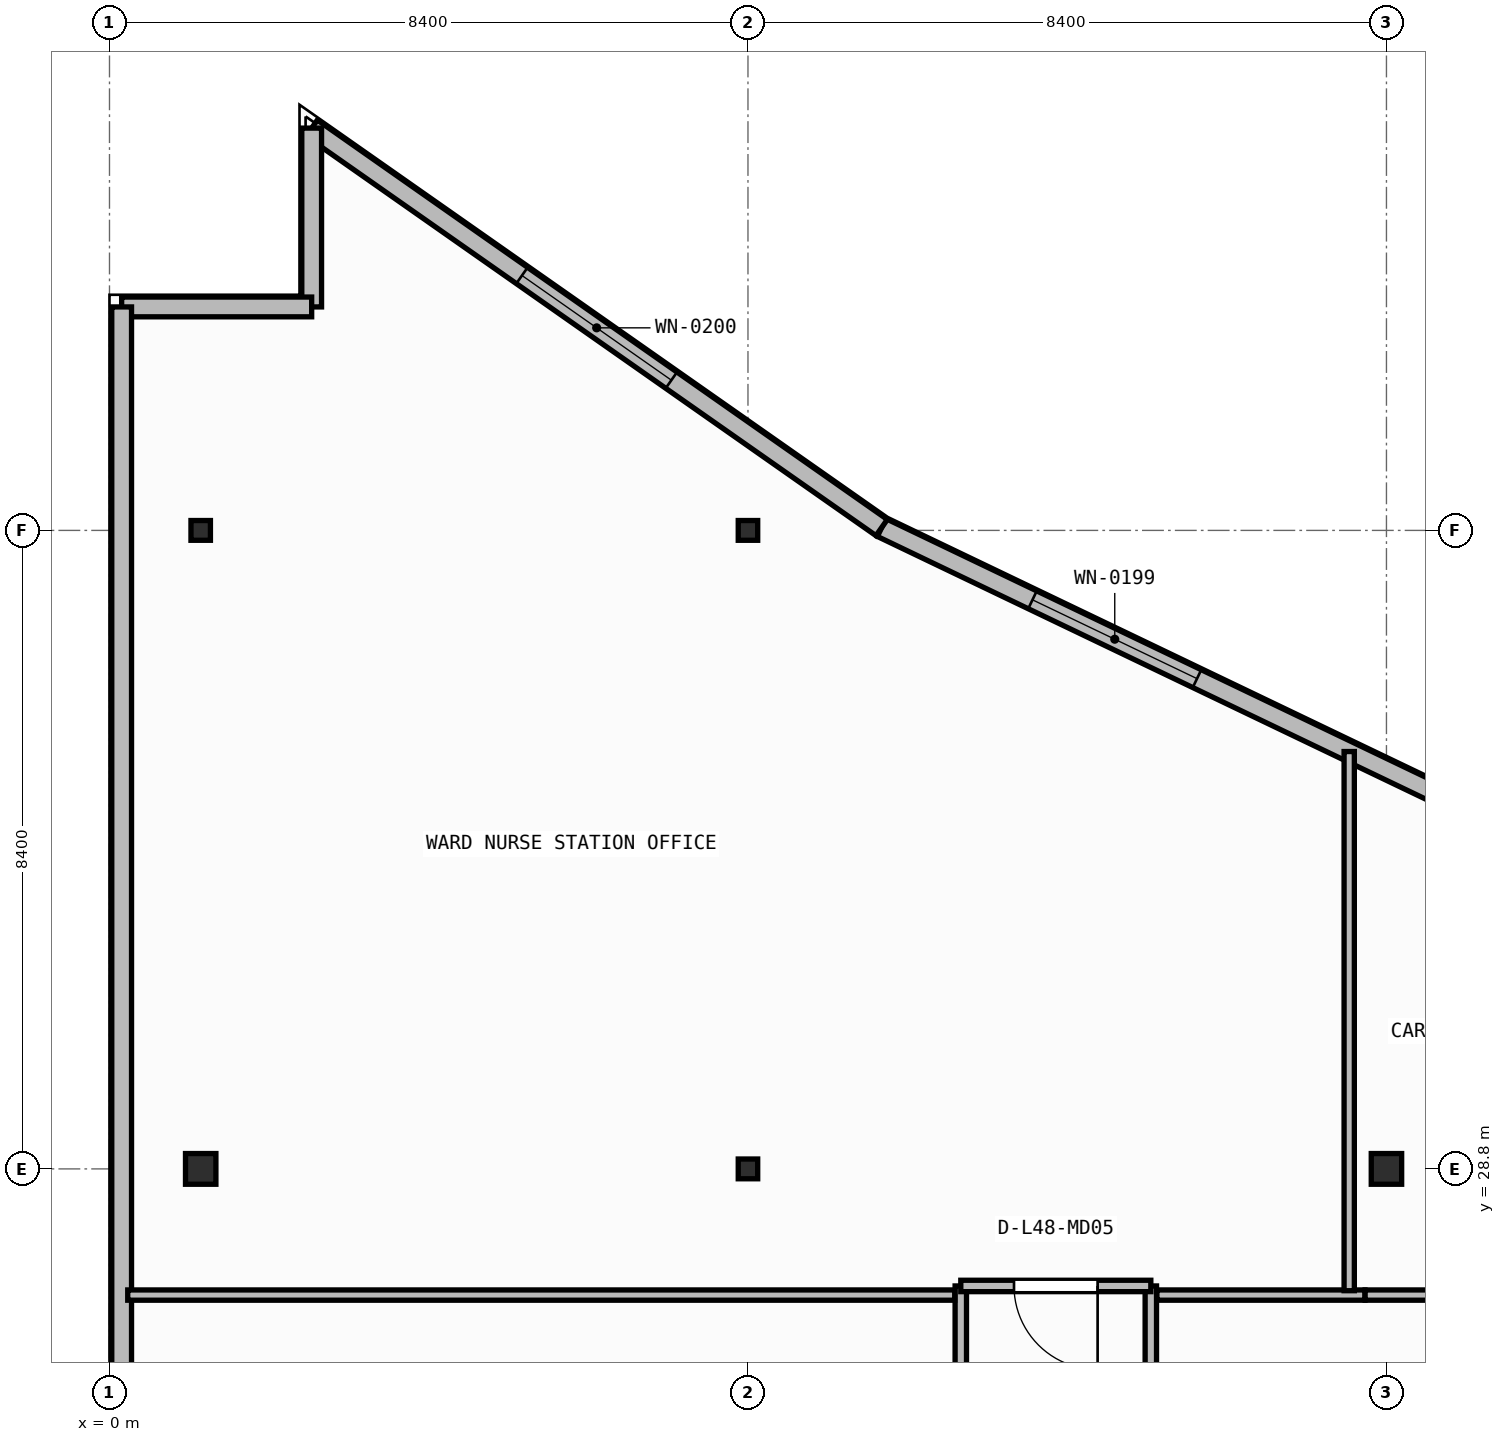
"""IFC4 building model, lengths in metres.
Left out: names, types, materials, properties, quantities, classifications, styles, units other than length and angle.
Written with IfcOpenShell. Run it as: python <this file> out.ifc"""

import sys

from ifc_helpers import new_model, si_unit, direction, frame, frame_2d, origin, origin_2d, place, context, subcontext, project, spatial, rectangle, i_section, extrude, element, fill, save


model = new_model("IFC4")
c1 = context("Model", 3, precision=1e-05, world=origin(), true_north=direction((0.0, 1.0)))
c2 = subcontext(c1, "Body", "Model", "MODEL_VIEW")
j1 = project(units=[si_unit("LENGTHUNIT", "METRE"), si_unit("PLANEANGLEUNIT", "RADIAN")], contexts=[c1])
p1 = place(None, origin())
s1 = spatial("IfcSite", under=j1, at=p1, CompositionType="ELEMENT")
p2 = place(p1, origin())
s2 = spatial("IfcBuilding", under=s1, at=p2, CompositionType="ELEMENT")
p3 = place(p2, frame((0.0, 0.0, 196.05)))
s3 = spatial("IfcBuildingStorey", under=s2, at=p3, CompositionType="ELEMENT", Elevation=196.05)
p4 = place(p3, frame((1.2, 28.8, 0.0), z_axis=(0.0, 0.0, 1.0), x_axis=(1.0, 0.0, 0.0)))
e1 = element("IfcColumn", 1, at=p4, inside=s3, PredefinedType="COLUMN", context=c2, shape_type="SweptSolid", body=[
    extrude(i_section(OverallWidth=0.4, OverallDepth=0.404, WebThickness=0.02, FlangeThickness=0.032, at=origin_2d()), origin(), (0.0, 0.0, 1.0), 3.95),
])
p5 = place(p3, frame((8.4, 28.8, 0.0), z_axis=(0.0, 0.0, 1.0), x_axis=(1.0, 0.0, 0.0)))
e2 = element("IfcColumn", 2, at=p5, inside=s3, PredefinedType="COLUMN", context=c2, shape_type="SweptSolid", body=[
    extrude(i_section(OverallWidth=0.256, OverallDepth=0.26, WebThickness=0.01, FlangeThickness=0.017, FilletRadius=0.013, at=origin_2d()), origin(), (0.0, 0.0, 1.0), 3.95),
])
p6 = place(p3, frame((16.8, 28.8, 0.0), z_axis=(0.0, 0.0, 1.0), x_axis=(1.0, 0.0, 0.0)))
e3 = element("IfcColumn", 3, at=p6, inside=s3, PredefinedType="COLUMN", context=c2, shape_type="SweptSolid", body=[
    extrude(i_section(OverallWidth=0.4, OverallDepth=0.404, WebThickness=0.02, FlangeThickness=0.032, at=origin_2d()), origin(), (0.0, 0.0, 1.0), 3.95),
])
for number, where, z_axis, x_axis in (
    (4, (1.2, 37.2, 0.0), (0.0, 0.0, 1.0), (1.0, 0.0, 0.0)),
    (5, (8.4, 37.2, 0.0), (0.0, 0.0, 1.0), (1.0, 0.0, 0.0)),
):
    element("IfcColumn", number, at=place(p3, frame(where, z_axis=z_axis, x_axis=x_axis)), inside=s3, PredefinedType="COLUMN", context=c2, shape_type="SweptSolid", body=[
        extrude(i_section(OverallWidth=0.256, OverallDepth=0.26, WebThickness=0.01, FlangeThickness=0.017, FilletRadius=0.013, at=origin_2d()), origin(), (0.0, 0.0, 1.0), 3.95),
    ])
p7 = place(p3, frame((21.461, 31.823, 0.0), z_axis=(0.0, 0.0, 1.0), x_axis=(-0.901858094827, 0.432032379336, 0.0)))
e6 = element("IfcWall", 6, at=p7, inside=s3, PredefinedType="STANDARD", context=c2, shape_type="SweptSolid", body=[
    extrude(rectangle(XDim=12.532, YDim=0.26, at=frame_2d((6.266, 0.0))), origin(), (0.0, 0.0, 1.0), 3.71),
])
p8 = place(p7, frame((7.932, 0.0, 0.9)))
e7 = element("IfcOpeningElement", 7, at=p8, cuts=e6, PredefinedType="OPENING", context=c2, shape_type="SweptSolid", body=[
    extrude(rectangle(XDim=2.4, YDim=1.65, at=frame_2d((1.2, 0.825))), frame((0.0, 0.14, 0.0), z_axis=(0.0, -1.0, 0.0), x_axis=(1.0, 0.0, 0.0)), (0.0, 0.0, 1.0), 0.28),
])
p9 = place(p3, frame((10.159, 37.237, 0.0), z_axis=(0.0, 0.0, 1.0), x_axis=(-0.818933702389, 0.57388813465, 0.0)))
e8 = element("IfcWall", 8, at=p9, inside=s3, PredefinedType="STANDARD", context=c2, shape_type="SweptSolid", body=[
    extrude(rectangle(XDim=9.157, YDim=0.26, at=frame_2d((4.579, 0.0))), origin(), (0.0, 0.0, 1.0), 3.71),
])
p10 = place(p9, frame((3.378, 0.0, 0.9)))
e9 = element("IfcOpeningElement", 9, at=p10, cuts=e8, PredefinedType="OPENING", context=c2, shape_type="SweptSolid", body=[
    extrude(rectangle(XDim=2.4, YDim=1.65, at=frame_2d((1.2, 0.825))), frame((0.0, 0.14, 0.0), z_axis=(0.0, -1.0, 0.0), x_axis=(1.0, 0.0, 0.0)), (0.0, 0.0, 1.0), 0.28),
])
p11 = place(p3, frame((2.66, 42.492, 0.0), z_axis=(0.0, 0.0, 1.0), x_axis=(0.0, -1.0, 0.0)))
e10 = element("IfcWall", 10, at=p11, inside=s3, PredefinedType="STANDARD", context=c2, shape_type="SweptSolid", body=[
    extrude(rectangle(XDim=2.353, YDim=0.26, at=frame_2d((1.176, 0.0))), origin(), (0.0, 0.0, 1.0), 3.71),
])
p12 = place(p3, frame((2.66, 40.14, 0.0), z_axis=(0.0, 0.0, 1.0), x_axis=(-1.0, 0.0, 0.0)))
e11 = element("IfcWall", 11, at=p12, inside=s3, PredefinedType="STANDARD", context=c2, shape_type="SweptSolid", body=[
    extrude(rectangle(XDim=2.5, YDim=0.26, at=frame_2d((1.25, 0.0))), origin(), (0.0, 0.0, 1.0), 3.71),
])
p13 = place(p3, frame((0.16, 40.14, 0.0), z_axis=(0.0, 0.0, 1.0), x_axis=(0.0, -1.0, 0.0)))
e12 = element("IfcWall", 12, at=p13, inside=s3, PredefinedType="STANDARD", context=c2, shape_type="SweptSolid", body=[
    extrude(rectangle(XDim=37.48, YDim=0.26, at=frame_2d((18.74, 0.0))), origin(), (0.0, 0.0, 1.0), 3.71),
])
p14 = place(p13, frame((27.4, 0.0, 0.9)))
e13 = element("IfcOpeningElement", 13, at=p14, cuts=e12, PredefinedType="OPENING", context=c2, shape_type="SweptSolid", body=[
    extrude(rectangle(XDim=2.4, YDim=1.65, at=frame_2d((1.2, 0.825))), frame((0.0, 0.14, 0.0), z_axis=(0.0, -1.0, 0.0), x_axis=(1.0, 0.0, 0.0)), (0.0, 0.0, 1.0), 0.28),
])
p15 = place(p3, frame((11.2, 27.26, 0.0), z_axis=(0.0, 0.0, 1.0), x_axis=(0.0, -1.0, 0.0)))
e14 = element("IfcWall", 14, at=p15, inside=s3, PredefinedType="PARTITIONING", context=c2, shape_type="SweptSolid", body=[
    extrude(rectangle(XDim=6.592, YDim=0.15, at=frame_2d((3.296, 0.0))), origin(), (0.0, 0.0, 1.0), 3.71),
])
p16 = place(p15, frame((2.746, 0.0, 0.0)))
e15 = element("IfcOpeningElement", 15, at=p16, cuts=e14, PredefinedType="OPENING", context=c2, shape_type="SweptSolid", body=[
    extrude(rectangle(XDim=1.1, YDim=2.1, at=frame_2d((0.55, 1.05))), frame((0.0, 0.085, 0.0), z_axis=(0.0, -1.0, 0.0), x_axis=(1.0, 0.0, 0.0)), (0.0, 0.0, 1.0), 0.17),
])
p17 = place(p3, frame((13.7, 20.668, 0.0), z_axis=(0.0, 0.0, 1.0), x_axis=(0.0, 1.0, 0.0)))
e16 = element("IfcWall", 16, at=p17, inside=s3, PredefinedType="PARTITIONING", context=c2, shape_type="SweptSolid", body=[
    extrude(rectangle(XDim=6.592, YDim=0.15, at=frame_2d((3.296, 0.0))), origin(), (0.0, 0.0, 1.0), 3.71),
])
p18 = place(p17, frame((2.746, 0.0, 0.0)))
e17 = element("IfcOpeningElement", 17, at=p18, cuts=e16, PredefinedType="OPENING", context=c2, shape_type="SweptSolid", body=[
    extrude(rectangle(XDim=1.1, YDim=2.1, at=frame_2d((0.55, 1.05))), frame((0.0, 0.085, 0.0), z_axis=(0.0, -1.0, 0.0), x_axis=(1.0, 0.0, 0.0)), (0.0, 0.0, 1.0), 0.17),
])
p19 = place(p3, frame((13.7, 27.26, 0.0), z_axis=(0.0, 0.0, 1.0), x_axis=(-1.0, 0.0, 0.0)))
e18 = element("IfcWall", 18, at=p19, inside=s3, PredefinedType="PARTITIONING", context=c2, shape_type="SweptSolid", body=[
    extrude(rectangle(XDim=2.5, YDim=0.15, at=frame_2d((1.25, 0.0))), origin(), (0.0, 0.0, 1.0), 3.71),
])
p20 = place(p19, frame((0.7, 0.0, 0.0)))
e19 = element("IfcOpeningElement", 19, at=p20, cuts=e18, PredefinedType="OPENING", context=c2, shape_type="SweptSolid", body=[
    extrude(rectangle(XDim=1.1, YDim=2.1, at=frame_2d((0.55, 1.05))), frame((0.0, 0.085, 0.0), z_axis=(0.0, -1.0, 0.0), x_axis=(1.0, 0.0, 0.0)), (0.0, 0.0, 1.0), 0.17),
])
p21 = place(p3, frame((11.12, 27.14, 0.0), z_axis=(0.0, 0.0, 1.0), x_axis=(-1.0, 0.0, 0.0)))
e20 = element("IfcWall", 20, at=p21, inside=s3, PredefinedType="PARTITIONING", context=c2, shape_type="SweptSolid", body=[
    extrude(rectangle(XDim=10.88, YDim=0.135, at=frame_2d((5.44, 0.0))), origin(), (0.0, 0.0, 1.0), 3.71),
])
p22 = place(p3, frame((16.518, 27.14, 0.0), z_axis=(0.0, 0.0, 1.0), x_axis=(-1.0, 0.0, 0.0)))
e21 = element("IfcWall", 21, at=p22, inside=s3, PredefinedType="PARTITIONING", context=c2, shape_type="SweptSolid", body=[
    extrude(rectangle(XDim=2.738, YDim=0.135, at=frame_2d((1.369, 0.0))), origin(), (0.0, 0.0, 1.0), 3.71),
])
p23 = place(p3, frame((36.2, 27.14, 0.0), z_axis=(0.0, 0.0, 1.0), x_axis=(-1.0, 0.0, 0.0)))
e22 = element("IfcWall", 22, at=p23, inside=s3, PredefinedType="PARTITIONING", context=c2, shape_type="SweptSolid", body=[
    extrude(rectangle(XDim=19.68, YDim=0.135, at=frame_2d((9.84, 0.0))), origin(), (0.0, 0.0, 1.0), 3.71),
])
p24 = place(p23, frame((14.744, 0.0, 0.0)))
e23 = element("IfcOpeningElement", 23, at=p24, cuts=e22, PredefinedType="OPENING", context=c2, shape_type="SweptSolid", body=[
    extrude(rectangle(XDim=1.1, YDim=2.1, at=frame_2d((0.55, 1.05))), frame((0.0, 0.077, 0.0), z_axis=(0.0, -1.0, 0.0), x_axis=(1.0, 0.0, 0.0)), (0.0, 0.0, 1.0), 0.155),
])
p25 = place(p3, frame((16.31, 27.198, 0.0), z_axis=(0.0, 0.0, 1.0), x_axis=(0.0, 1.0, 0.0)))
e24 = element("IfcWall", 24, at=p25, inside=s3, PredefinedType="PARTITIONING", context=c2, shape_type="SweptSolid", body=[
    extrude(rectangle(XDim=7.093, YDim=0.135, at=frame_2d((3.547, 0.0))), origin(), (0.0, 0.0, 1.0), 3.152),
])
p26 = place(p8, origin())
e25 = element("IfcWindow", 25, at=p26, inside=s3, PartitioningType="SINGLE_PANEL", PredefinedType="WINDOW", context=c2, shape_type="SweptSolid", body=[
    extrude(rectangle(XDim=2.4, YDim=1.65, at=frame_2d((1.2, 0.825))), frame((0.0, 0.03, 0.0), z_axis=(0.0, -1.0, 0.0), x_axis=(1.0, 0.0, 0.0)), (0.0, 0.0, 1.0), 0.06),
])
fill(e7, e25)
p27 = place(p10, origin())
e26 = element("IfcWindow", 26, at=p27, inside=s3, PartitioningType="SINGLE_PANEL", PredefinedType="WINDOW", context=c2, shape_type="SweptSolid", body=[
    extrude(rectangle(XDim=2.4, YDim=1.65, at=frame_2d((1.2, 0.825))), frame((0.0, 0.03, 0.0), z_axis=(0.0, -1.0, 0.0), x_axis=(1.0, 0.0, 0.0)), (0.0, 0.0, 1.0), 0.06),
])
fill(e9, e26)
p28 = place(p20, origin())
e27 = element("IfcDoor", 27, at=p28, inside=s3, OperationType="SINGLE_SWING_LEFT", PredefinedType="DOOR", context=c2, shape_type="SweptSolid", body=[
    extrude(rectangle(XDim=1.1, YDim=2.1, at=frame_2d((0.55, 1.05))), frame((0.0, 0.025, 0.0), z_axis=(0.0, -1.0, 0.0), x_axis=(1.0, 0.0, 0.0)), (0.0, 0.0, 1.0), 0.05),
])
fill(e19, e27)
save(model, sys.argv[1])
